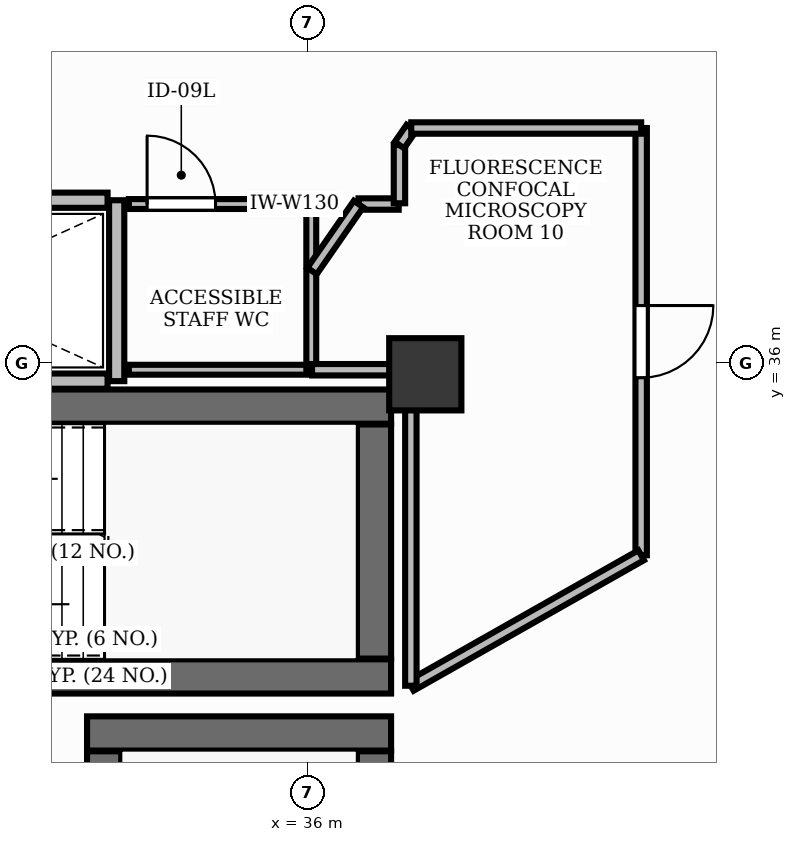
"""IFC4 building model, lengths in metres.
Left out: names, types, materials, properties, quantities, classifications, styles, units other than length and angle.
Written with IfcOpenShell. Run it as: python <this file> out.ifc"""

import sys

from ifc_helpers import new_model, si_unit, direction, frame, frame_2d, origin, origin_2d, place, context, subcontext, project, spatial, rectangle, extrude, element, fill, save


model = new_model("IFC4")
c1 = context("Model", 3, precision=1e-05, world=origin(), true_north=direction((0.0, 1.0)))
c2 = subcontext(c1, "Body", "Model", "MODEL_VIEW")
j1 = project(units=[si_unit("LENGTHUNIT", "METRE"), si_unit("PLANEANGLEUNIT", "RADIAN")], contexts=[c1])
p1 = place(None, origin())
s1 = spatial("IfcSite", under=j1, at=p1, CompositionType="ELEMENT")
p2 = place(p1, origin())
s2 = spatial("IfcBuilding", under=s1, at=p2, CompositionType="ELEMENT")
p3 = place(p2, frame((0.0, 0.0, 42.6)))
s3 = spatial("IfcBuildingStorey", under=s2, at=p3, CompositionType="ELEMENT", Elevation=42.6)
p4 = place(p3, frame((28.852, 35.425, 0.0), z_axis=(0.0, 0.0, 1.0), x_axis=(1.0, 0.0, 0.0)))
e1 = element("IfcWall", 1, at=p4, inside=s3, PredefinedType="SHEAR", context=c2, shape_type="SweptSolid", body=[
    extrude(rectangle(XDim=8.248, YDim=0.45, at=frame_2d((4.124, 0.0))), origin(), (0.0, 0.0, 1.0), 3.9),
])
p5 = place(p3, frame((28.35, 31.875, 0.0), z_axis=(0.0, 0.0, 1.0), x_axis=(1.0, 0.0, 0.0)))
e2 = element("IfcWall", 2, at=p5, inside=s3, PredefinedType="SHEAR", context=c2, shape_type="SweptSolid", body=[
    extrude(rectangle(XDim=8.75, YDim=0.45, at=frame_2d((4.375, 0.0))), origin(), (0.0, 0.0, 1.0), 3.9),
])
p6 = place(p3, frame((36.875, 32.11, 0.0), z_axis=(0.0, 0.0, 1.0), x_axis=(0.0, 1.0, 0.0)))
e3 = element("IfcWall", 3, at=p6, inside=s3, PredefinedType="SHEAR", context=c2, shape_type="SweptSolid", body=[
    extrude(rectangle(XDim=3.08, YDim=0.45, at=frame_2d((1.54, 0.0))), origin(), (0.0, 0.0, 1.0), 3.9),
])
p7 = place(p3, frame((33.1, 31.125, 0.0), z_axis=(0.0, 0.0, 1.0), x_axis=(1.0, 0.0, 0.0)))
e4 = element("IfcWall", 4, at=p7, inside=s3, PredefinedType="SHEAR", context=c2, shape_type="SweptSolid", body=[
    extrude(rectangle(XDim=4.0, YDim=0.45, at=frame_2d((2.0, 0.0))), origin(), (0.0, 0.0, 1.0), 3.9),
])
p8 = place(p3, frame((36.875, 23.11, 0.0), z_axis=(0.0, 0.0, 1.0), x_axis=(0.0, 1.0, 0.0)))
e5 = element("IfcWall", 5, at=p8, inside=s3, PredefinedType="SHEAR", context=c2, shape_type="SweptSolid", body=[
    extrude(rectangle(XDim=7.78, YDim=0.45, at=frame_2d((3.89, 0.0))), origin(), (0.0, 0.0, 1.0), 3.9),
])
p9 = place(p3, frame((33.325, 23.11, 0.0), z_axis=(0.0, 0.0, 1.0), x_axis=(0.0, 1.0, 0.0)))
e6 = element("IfcWall", 6, at=p9, inside=s3, PredefinedType="SHEAR", context=c2, shape_type="SweptSolid", body=[
    extrude(rectangle(XDim=7.78, YDim=0.45, at=frame_2d((3.89, 0.0))), origin(), (0.0, 0.0, 1.0), 3.9),
])
p10 = place(p9, frame((0.2, 0.0, 0.0)))
e7 = element("IfcOpeningElement", 7, at=p10, cuts=e6, PredefinedType="OPENING", context=c2, shape_type="SweptSolid", body=[
    extrude(rectangle(XDim=1.05, YDim=2.15, at=frame_2d((0.525, 1.075))), frame((0.0, 0.24, 0.0), z_axis=(0.0, -1.0, 0.0), x_axis=(1.0, 0.0, 0.0)), (0.0, 0.0, 1.0), 0.48),
])
p11 = place(p3, frame((37.55, 35.85, -0.0), z_axis=(0.0, 0.0, 1.0), x_axis=(1.0, 0.0, 0.0)))
e8 = element("IfcColumn", 8, at=p11, inside=s3, PredefinedType="PILASTER", context=c2, shape_type="SweptSolid", body=[
    extrude(rectangle(XDim=0.95, YDim=0.95, at=origin_2d()), origin(), (0.0, 0.0, 1.0), 3.901),
])
p12 = place(p3, frame((33.49, 35.76, 0.0), z_axis=(0.0, 0.0, 1.0), x_axis=(0.0, 1.0, 0.0)))
e9 = element("IfcWall", 9, at=p12, inside=s3, PredefinedType="PARTITIONING", context=c2, shape_type="SweptSolid", body=[
    extrude(rectangle(XDim=2.38, YDim=0.2, at=frame_2d((1.19, 0.0))), origin(), (0.0, 0.0, 1.0), 2.91),
])
for number, where, z_axis, x_axis in (
    (10, (28.8, 35.76, 0.0), (0.0, 0.0, 1.0), (1.0, 0.0, 0.0)),
    (11, (28.8, 38.14, 0.0), (0.0, 0.0, 1.0), (1.0, 0.0, 0.0)),
):
    element("IfcWall", number, at=place(p3, frame(where, z_axis=z_axis, x_axis=x_axis)), inside=s3, PredefinedType="PARTITIONING", context=c2, shape_type="SweptSolid", body=[
        extrude(rectangle(XDim=4.57, YDim=0.2, at=frame_2d((2.285, 0.0))), origin(), (0.0, 0.0, 1.0), 2.91),
    ])
p13 = place(p3, frame((33.65, 38.09, 0.0), z_axis=(0.0, 0.0, 1.0), x_axis=(1.0, 0.0, 0.0)))
e12 = element("IfcWall", 12, at=p13, inside=s3, PredefinedType="PARTITIONING", context=c2, shape_type="SweptSolid", body=[
    extrude(rectangle(XDim=2.4, YDim=0.13, at=frame_2d((1.2, 0.0))), origin(), (0.0, 0.0, 1.0), 2.91),
])
p14 = place(p13, frame((0.24, 0.0, 0.0)))
e13 = element("IfcOpeningElement", 13, at=p14, cuts=e12, PredefinedType="OPENING", context=c2, shape_type="SweptSolid", body=[
    extrude(rectangle(XDim=0.9, YDim=2.15, at=frame_2d((0.45, 1.075))), frame((0.0, 0.08, 0.0), z_axis=(0.0, -1.0, 0.0), x_axis=(1.0, 0.0, 0.0)), (0.0, 0.0, 1.0), 0.16),
])
p15 = place(p3, frame((40.39, 39.09, 0.0), z_axis=(0.0, 0.0, 1.0), x_axis=(0.0, -1.0, 0.0)))
e14 = element("IfcWall", 14, at=p15, inside=s3, PredefinedType="PARTITIONING", context=c2, shape_type="SweptSolid", body=[
    extrude(rectangle(XDim=5.621, YDim=0.15, at=frame_2d((2.811, 0.0))), origin(), (0.0, 0.0, 1.0), 2.91),
])
p16 = place(p15, frame((2.335, 0.0, 0.0)))
e15 = element("IfcOpeningElement", 15, at=p16, cuts=e14, PredefinedType="OPENING", context=c2, shape_type="SweptSolid", body=[
    extrude(rectangle(XDim=0.95, YDim=2.15, at=frame_2d((0.475, 1.075))), frame((0.0, 0.09, 0.0), z_axis=(0.0, -1.0, 0.0), x_axis=(1.0, 0.0, 0.0)), (0.0, 0.0, 1.0), 0.18),
])
p17 = place(p3, frame((36.05, 35.91, 0.0), z_axis=(0.0, 0.0, 1.0), x_axis=(-1.0, 0.0, 0.0)))
e16 = element("IfcWall", 16, at=p17, inside=s3, PredefinedType="PARTITIONING", context=c2, shape_type="SweptSolid", body=[
    extrude(rectangle(XDim=2.4, YDim=0.13, at=frame_2d((1.2, 0.0))), origin(), (0.0, 0.0, 1.0), 2.91),
])
p18 = place(p3, frame((36.05, 38.09, 0.0), z_axis=(0.0, 0.0, 1.0), x_axis=(0.0, -1.0, 0.0)))
e17 = element("IfcWall", 17, at=p18, inside=s3, PredefinedType="PARTITIONING", context=c2, shape_type="SweptSolid", body=[
    extrude(rectangle(XDim=2.18, YDim=0.13, at=frame_2d((1.09, 0.0))), origin(), (0.0, 0.0, 1.0), 2.91),
])
p19 = place(p3, frame((36.671, 38.09, 0.0), z_axis=(0.0, 0.0, 1.0), x_axis=(1.0, 0.0, 0.0)))
e18 = element("IfcWall", 18, at=p19, inside=s3, PredefinedType="PARTITIONING", context=c2, shape_type="SweptSolid", body=[
    extrude(rectangle(XDim=0.529, YDim=0.15, at=frame_2d((0.264, 0.0))), origin(), (0.0, 0.0, 1.0), 2.91),
])
p20 = place(p3, frame((37.21, 38.1, 0.0), z_axis=(0.0, 0.0, 1.0), x_axis=(0.0, 1.0, 0.0)))
e19 = element("IfcWall", 19, at=p20, inside=s3, PredefinedType="PARTITIONING", context=c2, shape_type="SweptSolid", body=[
    extrude(rectangle(XDim=0.766, YDim=0.15, at=frame_2d((0.383, 0.0))), origin(), (0.0, 0.0, 1.0), 2.91),
])
p21 = place(p3, frame((37.21, 38.866, 0.0), z_axis=(0.0, 0.0, 1.0), x_axis=(0.570513293283, 0.821288367254, 0.0)))
e20 = element("IfcWall", 20, at=p21, inside=s3, PredefinedType="PARTITIONING", context=c2, shape_type="SweptSolid", body=[
    extrude(rectangle(XDim=0.273, YDim=0.15, at=frame_2d((0.136, 0.0))), origin(), (0.0, 0.0, 1.0), 2.91),
])
p22 = place(p3, frame((37.365, 39.09, 0.0), z_axis=(0.0, 0.0, 1.0), x_axis=(1.0, 0.0, 0.0)))
e21 = element("IfcWall", 21, at=p22, inside=s3, PredefinedType="PARTITIONING", context=c2, shape_type="SweptSolid", body=[
    extrude(rectangle(XDim=3.024, YDim=0.15, at=frame_2d((1.512, 0.0))), origin(), (0.0, 0.0, 1.0), 2.91),
])
p23 = place(p3, frame((40.39, 33.469, 0.0), z_axis=(0.0, 0.0, 1.0), x_axis=(-0.870092348199, -0.492888735523, 0.0)))
e22 = element("IfcWall", 22, at=p23, inside=s3, PredefinedType="PARTITIONING", context=c2, shape_type="SweptSolid", body=[
    extrude(rectangle(XDim=3.482, YDim=0.15, at=frame_2d((1.741, 0.0))), origin(), (0.0, 0.0, 1.0), 2.91),
])
p24 = place(p3, frame((37.36, 31.753, 0.0), z_axis=(0.0, 0.0, 1.0), x_axis=(0.0, 1.0, 0.0)))
e23 = element("IfcWall", 23, at=p24, inside=s3, PredefinedType="PARTITIONING", context=c2, shape_type="SweptSolid", body=[
    extrude(rectangle(XDim=4.147, YDim=0.15, at=frame_2d((2.074, 0.0))), origin(), (0.0, 0.0, 1.0), 2.91),
])
p25 = place(p3, frame((37.35, 35.91, 0.0), z_axis=(0.0, 0.0, 1.0), x_axis=(-1.0, 0.0, 0.0)))
e24 = element("IfcWall", 24, at=p25, inside=s3, PredefinedType="PARTITIONING", context=c2, shape_type="SweptSolid", body=[
    extrude(rectangle(XDim=1.29, YDim=0.15, at=frame_2d((0.645, 0.0))), origin(), (0.0, 0.0, 1.0), 2.91),
])
p26 = place(p3, frame((36.06, 37.209, 0.0), z_axis=(0.0, 0.0, 1.0), x_axis=(0.569943577232, 0.821683831393, 0.0)))
e25 = element("IfcWall", 25, at=p26, inside=s3, PredefinedType="PARTITIONING", context=c2, shape_type="SweptSolid", body=[
    extrude(rectangle(XDim=1.073, YDim=0.15, at=frame_2d((0.536, 0.0))), origin(), (0.0, 0.0, 1.0), 2.91),
])
p27 = place(p14, origin())
e26 = element("IfcDoor", 26, at=p27, inside=s3, OperationType="SINGLE_SWING_LEFT", PredefinedType="DOOR", context=c2, shape_type="SweptSolid", body=[
    extrude(rectangle(XDim=0.9, YDim=2.15, at=frame_2d((0.45, 1.075))), frame((0.0, 0.025, 0.0), z_axis=(0.0, -1.0, 0.0), x_axis=(1.0, 0.0, 0.0)), (0.0, 0.0, 1.0), 0.05),
])
fill(e13, e26)
p28 = place(p16, origin())
e27 = element("IfcDoor", 27, at=p28, inside=s3, OperationType="SINGLE_SWING_LEFT", PredefinedType="DOOR", context=c2, shape_type="SweptSolid", body=[
    extrude(rectangle(XDim=0.95, YDim=2.15, at=frame_2d((0.475, 1.075))), frame((0.0, 0.025, 0.0), z_axis=(0.0, -1.0, 0.0), x_axis=(1.0, 0.0, 0.0)), (0.0, 0.0, 1.0), 0.05),
])
fill(e15, e27)
save(model, sys.argv[1])
